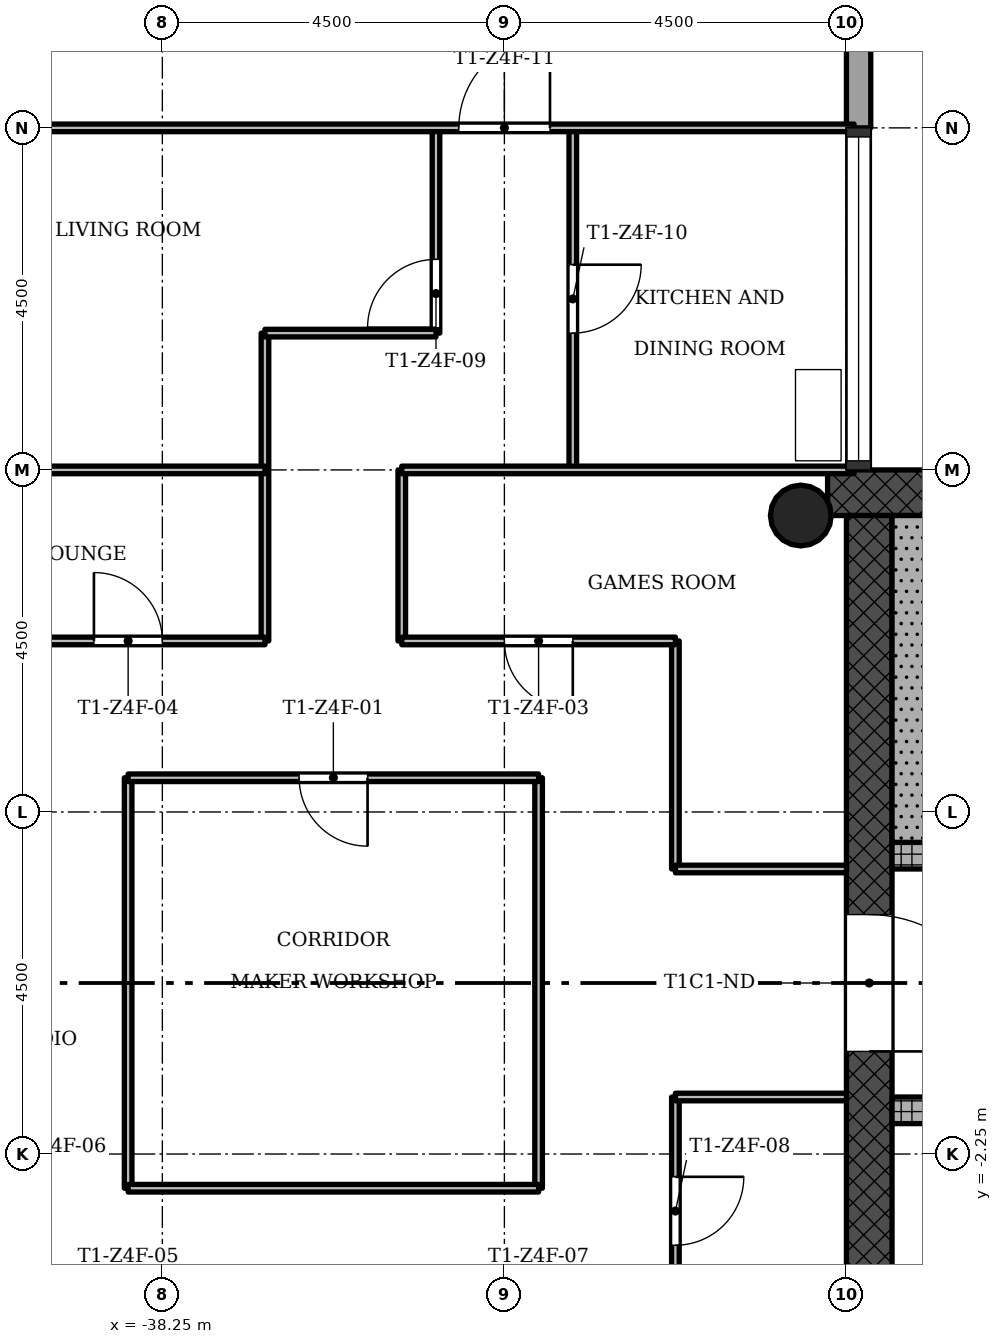
"""IFC4 building model, lengths in metres.
Left out: names, types, materials, properties, quantities, classifications, styles, units other than length and angle.
Written with IfcOpenShell. Run it as: python <this file> out.ifc"""

import sys

from ifc_helpers import new_model, si_unit, direction, frame, frame_2d, origin, origin_2d, place, context, subcontext, project, spatial, rectangle, hollow_circle, extrude, element, fill, save


model = new_model("IFC4")
c1 = context("Model", 3, precision=1e-05, world=origin(), true_north=direction((0.0, 1.0)))
c2 = subcontext(c1, "Body", "Model", "MODEL_VIEW")
j1 = project(units=[si_unit("LENGTHUNIT", "METRE"), si_unit("PLANEANGLEUNIT", "RADIAN")], contexts=[c1])
p1 = place(None, origin())
s1 = spatial("IfcSite", under=j1, at=p1, CompositionType="ELEMENT")
p2 = place(p1, origin())
s2 = spatial("IfcBuilding", under=s1, at=p2, CompositionType="ELEMENT")
p3 = place(p2, frame((0.0, 0.0, 223.2)))
s3 = spatial("IfcBuildingStorey", under=s2, at=p3, CompositionType="ELEMENT", Elevation=223.2)
p4 = place(p3, frame((-20.602, 6.45, 0.0), z_axis=(0.0, 0.0, 1.0), x_axis=(-1.0, 0.0, 0.0)))
e1 = element("IfcWall", 1, at=p4, inside=s3, PredefinedType="SHEAR", context=c2, shape_type="SweptSolid", body=[
    extrude(rectangle(XDim=8.896, YDim=0.6, at=frame_2d((4.448, 0.0))), origin(), (0.0, 0.0, 1.0), 3.4),
])
p5 = place(p3, frame((-28.95, 6.15, 0.0), z_axis=(0.0, 0.0, 1.0), x_axis=(0.0, -1.0, 0.0)))
e2 = element("IfcWall", 2, at=p5, inside=s3, PredefinedType="SHEAR", context=c2, shape_type="SweptSolid", body=[
    extrude(rectangle(XDim=12.9, YDim=0.6, at=frame_2d((6.45, 0.0))), origin(), (0.0, 0.0, 1.0), 3.4),
])
p6 = place(p5, frame((5.25, 0.0, 0.0)))
e3 = element("IfcOpeningElement", 3, at=p6, cuts=e2, PredefinedType="OPENING", context=c2, shape_type="SweptSolid", body=[
    extrude(rectangle(XDim=1.8, YDim=2.1, at=frame_2d((0.9, 1.05))), frame((0.0, 0.31, 0.0), z_axis=(0.0, -1.0, 0.0), x_axis=(1.0, 0.0, 0.0)), (0.0, 0.0, 1.0), 0.62),
])
p7 = place(p3, frame((-28.65, -1.675, 0.0), z_axis=(0.0, 0.0, 1.0), x_axis=(1.0, 0.0, 0.0)))
e4 = element("IfcWall", 4, at=p7, inside=s3, PredefinedType="SHEAR", context=c2, shape_type="SweptSolid", body=[
    extrude(rectangle(XDim=7.8, YDim=0.35, at=frame_2d((3.9, 0.0))), origin(), (0.0, 0.0, 1.0), 3.4),
])
p8 = place(p7, frame((1.15, 0.0, 0.0)))
e5 = element("IfcOpeningElement", 5, at=p8, cuts=e4, PredefinedType="OPENING", context=c2, shape_type="SweptSolid", body=[
    extrude(rectangle(XDim=1.1, YDim=2.1, at=frame_2d((0.55, 1.05))), frame((0.0, 0.185, 0.0), z_axis=(0.0, -1.0, 0.0), x_axis=(1.0, 0.0, 0.0)), (0.0, 0.0, 1.0), 0.37),
])
p9 = place(p7, frame((3.35, 0.0, 0.0)))
e6 = element("IfcOpeningElement", 6, at=p9, cuts=e4, PredefinedType="OPENING", context=c2, shape_type="SweptSolid", body=[
    extrude(rectangle(XDim=1.1, YDim=2.1, at=frame_2d((0.55, 1.05))), frame((0.0, 0.185, 0.0), z_axis=(0.0, -1.0, 0.0), x_axis=(1.0, 0.0, 0.0)), (0.0, 0.0, 1.0), 0.37),
])
p10 = place(p7, frame((5.55, 0.0, 0.0)))
e7 = element("IfcOpeningElement", 7, at=p10, cuts=e4, PredefinedType="OPENING", context=c2, shape_type="SweptSolid", body=[
    extrude(rectangle(XDim=1.1, YDim=2.1, at=frame_2d((0.55, 1.05))), frame((0.0, 0.185, 0.0), z_axis=(0.0, -1.0, 0.0), x_axis=(1.0, 0.0, 0.0)), (0.0, 0.0, 1.0), 0.37),
])
p11 = place(p3, frame((-28.65, 1.675, 0.0), z_axis=(0.0, 0.0, 1.0), x_axis=(1.0, 0.0, 0.0)))
e8 = element("IfcWall", 8, at=p11, inside=s3, PredefinedType="SHEAR", context=c2, shape_type="SweptSolid", body=[
    extrude(rectangle(XDim=7.8, YDim=0.35, at=frame_2d((3.9, 0.0))), origin(), (0.0, 0.0, 1.0), 3.4),
])
p12 = place(p11, frame((1.05, 0.0, 0.0)))
e9 = element("IfcOpeningElement", 9, at=p12, cuts=e8, PredefinedType="OPENING", context=c2, shape_type="SweptSolid", body=[
    extrude(rectangle(XDim=0.9, YDim=2.1, at=frame_2d((0.45, 1.05))), frame((0.0, 0.185, 0.0), z_axis=(0.0, -1.0, 0.0), x_axis=(1.0, 0.0, 0.0)), (0.0, 0.0, 1.0), 0.37),
])
p13 = place(p3, frame((-29.85, 6.15, 0.0), z_axis=(0.0, 0.0, 1.0), x_axis=(1.0, 0.0, 0.0)))
e10 = element("IfcColumn", 10, at=p13, inside=s3, PredefinedType="COLUMN", context=c2, shape_type="SweptSolid", body=[
    extrude(hollow_circle(Radius=0.4, WallThickness=0.028, at=origin_2d()), origin(), (0.0, 0.0, 1.0), 3.4),
])
p14 = place(p3, frame((-29.09, 11.25, -0.3), z_axis=(0.0, 0.0, 1.0), x_axis=(0.0, 1.0, 0.0)))
e11 = element("IfcWall", 11, at=p14, inside=s3, PredefinedType="STANDARD", context=c2, shape_type="SweptSolid", body=[
    extrude(rectangle(XDim=1.82, YDim=0.32, at=frame_2d((0.91, 0.0))), origin(), (0.0, 0.0, 1.0), 3.4),
])
p15 = place(p3, frame((-38.7, -2.7, 0.0), z_axis=(0.0, 0.0, 1.0), x_axis=(0.0, 1.0, 0.0)))
e12 = element("IfcWall", 12, at=p15, inside=s3, PredefinedType="PARTITIONING", context=c2, shape_type="SweptSolid", body=[
    extrude(rectangle(XDim=5.4, YDim=0.1, at=frame_2d((2.7, 0.0))), origin(), (0.0, 0.0, 1.0), 3.0),
])
p16 = place(p3, frame((-36.9, 4.5, 0.0), z_axis=(0.0, 0.0, 1.0), x_axis=(0.0, 1.0, 0.0)))
e13 = element("IfcWall", 13, at=p16, inside=s3, PredefinedType="PARTITIONING", context=c2, shape_type="SweptSolid", body=[
    extrude(rectangle(XDim=4.05, YDim=0.1, at=frame_2d((2.025, 0.0))), origin(), (0.0, 0.0, 1.0), 3.0),
])
p17 = place(p3, frame((-35.1, 4.5, 0.0), z_axis=(0.0, 0.0, 1.0), x_axis=(0.0, 1.0, 0.0)))
e14 = element("IfcWall", 14, at=p17, inside=s3, PredefinedType="PARTITIONING", context=c2, shape_type="SweptSolid", body=[
    extrude(rectangle(XDim=2.25, YDim=0.1, at=frame_2d((1.125, 0.0))), origin(), (0.0, 0.0, 1.0), 3.0),
])
p18 = place(p3, frame((-34.65, 8.55, 0.0), z_axis=(0.0, 0.0, 1.0), x_axis=(0.0, 1.0, 0.0)))
e15 = element("IfcWall", 15, at=p18, inside=s3, PredefinedType="PARTITIONING", context=c2, shape_type="SweptSolid", body=[
    extrude(rectangle(XDim=2.7, YDim=0.1, at=frame_2d((1.35, 0.0))), origin(), (0.0, 0.0, 1.0), 3.0),
])
p19 = place(p18, frame((0.07, 0.0, 0.0)))
e16 = element("IfcOpeningElement", 16, at=p19, cuts=e15, PredefinedType="OPENING", context=c2, shape_type="SweptSolid", body=[
    extrude(rectangle(XDim=0.9, YDim=2.1, at=frame_2d((0.45, 1.05))), frame((0.0, 0.06, 0.0), z_axis=(0.0, -1.0, 0.0), x_axis=(1.0, 0.0, 0.0)), (0.0, 0.0, 1.0), 0.12),
])
p20 = place(p3, frame((-33.3, -2.7, 0.0), z_axis=(0.0, 0.0, 1.0), x_axis=(0.0, 1.0, 0.0)))
e17 = element("IfcWall", 17, at=p20, inside=s3, PredefinedType="PARTITIONING", context=c2, shape_type="SweptSolid", body=[
    extrude(rectangle(XDim=5.4, YDim=0.1, at=frame_2d((2.7, 0.0))), origin(), (0.0, 0.0, 1.0), 3.0),
])
p21 = place(p3, frame((-32.85, 6.75, 0.0), z_axis=(0.0, 0.0, 1.0), x_axis=(0.0, 1.0, 0.0)))
e18 = element("IfcWall", 18, at=p21, inside=s3, PredefinedType="PARTITIONING", context=c2, shape_type="SweptSolid", body=[
    extrude(rectangle(XDim=4.5, YDim=0.1, at=frame_2d((2.25, 0.0))), origin(), (0.0, 0.0, 1.0), 3.0),
])
p22 = place(p21, frame((1.8, 0.0, 0.0)))
e19 = element("IfcOpeningElement", 19, at=p22, cuts=e18, PredefinedType="OPENING", context=c2, shape_type="SweptSolid", body=[
    extrude(rectangle(XDim=0.9, YDim=2.1, at=frame_2d((0.45, 1.05))), frame((0.0, 0.06, 0.0), z_axis=(0.0, -1.0, 0.0), x_axis=(1.0, 0.0, 0.0)), (0.0, 0.0, 1.0), 0.12),
])
p23 = place(p3, frame((-31.5, -6.75, 0.0), z_axis=(0.0, 0.0, 1.0), x_axis=(0.0, 1.0, 0.0)))
e20 = element("IfcWall", 20, at=p23, inside=s3, PredefinedType="PARTITIONING", context=c2, shape_type="SweptSolid", body=[
    extrude(rectangle(XDim=5.25, YDim=0.1, at=frame_2d((2.625, 0.0))), origin(), (0.0, 0.0, 1.0), 3.0),
])
p24 = place(p23, frame((3.3, 0.0, 0.0)))
e21 = element("IfcOpeningElement", 21, at=p24, cuts=e20, PredefinedType="OPENING", context=c2, shape_type="SweptSolid", body=[
    extrude(rectangle(XDim=0.9, YDim=2.1, at=frame_2d((0.45, 1.05))), frame((0.0, 0.06, 0.0), z_axis=(0.0, -1.0, 0.0), x_axis=(1.0, 0.0, 0.0)), (0.0, 0.0, 1.0), 0.12),
])
p25 = place(p3, frame((-31.5, 1.5, 0.0), z_axis=(0.0, 0.0, 1.0), x_axis=(0.0, 1.0, 0.0)))
e22 = element("IfcWall", 22, at=p25, inside=s3, PredefinedType="PARTITIONING", context=c2, shape_type="SweptSolid", body=[
    extrude(rectangle(XDim=3.0, YDim=0.1, at=frame_2d((1.5, 0.0))), origin(), (0.0, 0.0, 1.0), 3.0),
])
p26 = place(p3, frame((-38.7, -2.7, 0.0), z_axis=(0.0, 0.0, 1.0), x_axis=(1.0, 0.0, 0.0)))
e23 = element("IfcWall", 23, at=p26, inside=s3, PredefinedType="PARTITIONING", context=c2, shape_type="SweptSolid", body=[
    extrude(rectangle(XDim=5.4, YDim=0.1, at=frame_2d((2.7, 0.0))), origin(), (0.0, 0.0, 1.0), 3.0),
])
for number, where, z_axis, x_axis in (
    (24, (-31.5, -1.5, 0.0), (0.0, 0.0, 1.0), (1.0, 0.0, 0.0)),
    (25, (-31.5, 1.5, 0.0), (0.0, 0.0, 1.0), (1.0, 0.0, 0.0)),
):
    element("IfcWall", number, at=place(p3, frame(where, z_axis=z_axis, x_axis=x_axis)), inside=s3, PredefinedType="PARTITIONING", context=c2, shape_type="SweptSolid", body=[
        extrude(rectangle(XDim=2.25, YDim=0.1, at=frame_2d((1.125, 0.0))), origin(), (0.0, 0.0, 1.0), 3.0),
    ])
p27 = place(p3, frame((-38.7, 2.7, 0.0), z_axis=(0.0, 0.0, 1.0), x_axis=(1.0, 0.0, 0.0)))
e26 = element("IfcWall", 26, at=p27, inside=s3, PredefinedType="PARTITIONING", context=c2, shape_type="SweptSolid", body=[
    extrude(rectangle(XDim=5.4, YDim=0.1, at=frame_2d((2.7, 0.0))), origin(), (0.0, 0.0, 1.0), 3.0),
])
p28 = place(p27, frame((2.25, 0.0, 0.0)))
e27 = element("IfcOpeningElement", 27, at=p28, cuts=e26, PredefinedType="OPENING", context=c2, shape_type="SweptSolid", body=[
    extrude(rectangle(XDim=0.9, YDim=2.1, at=frame_2d((0.45, 1.05))), frame((0.0, 0.06, 0.0), z_axis=(0.0, -1.0, 0.0), x_axis=(1.0, 0.0, 0.0)), (0.0, 0.0, 1.0), 0.12),
])
p29 = place(p3, frame((-40.5, 4.5, 0.0), z_axis=(0.0, 0.0, 1.0), x_axis=(1.0, 0.0, 0.0)))
e28 = element("IfcWall", 28, at=p29, inside=s3, PredefinedType="PARTITIONING", context=c2, shape_type="SweptSolid", body=[
    extrude(rectangle(XDim=3.6, YDim=0.1, at=frame_2d((1.8, 0.0))), origin(), (0.0, 0.0, 1.0), 3.0),
])
p30 = place(p29, frame((1.35, 0.0, 0.0)))
e29 = element("IfcOpeningElement", 29, at=p30, cuts=e28, PredefinedType="OPENING", context=c2, shape_type="SweptSolid", body=[
    extrude(rectangle(XDim=0.9, YDim=2.1, at=frame_2d((0.45, 1.05))), frame((0.0, 0.06, 0.0), z_axis=(0.0, -1.0, 0.0), x_axis=(1.0, 0.0, 0.0)), (0.0, 0.0, 1.0), 0.12),
])
p31 = place(p3, frame((-35.1, 4.5, 0.0), z_axis=(0.0, 0.0, 1.0), x_axis=(1.0, 0.0, 0.0)))
e30 = element("IfcWall", 30, at=p31, inside=s3, PredefinedType="PARTITIONING", context=c2, shape_type="SweptSolid", body=[
    extrude(rectangle(XDim=3.6, YDim=0.1, at=frame_2d((1.8, 0.0))), origin(), (0.0, 0.0, 1.0), 3.0),
])
p32 = place(p31, frame((1.35, 0.0, 0.0)))
e31 = element("IfcOpeningElement", 31, at=p32, cuts=e30, PredefinedType="OPENING", context=c2, shape_type="SweptSolid", body=[
    extrude(rectangle(XDim=0.9, YDim=2.1, at=frame_2d((0.45, 1.05))), frame((0.0, 0.06, 0.0), z_axis=(0.0, -1.0, 0.0), x_axis=(1.0, 0.0, 0.0)), (0.0, 0.0, 1.0), 0.12),
])
for number, where, z_axis, x_axis in (
    (32, (-42.85, 6.75, 0.0), (0.0, 0.0, 1.0), (1.0, 0.0, 0.0)),
    (33, (-35.1, 6.75, 0.0), (0.0, 0.0, 1.0), (1.0, 0.0, 0.0)),
):
    element("IfcWall", number, at=place(p3, frame(where, z_axis=z_axis, x_axis=x_axis)), inside=s3, PredefinedType="PARTITIONING", context=c2, shape_type="SweptSolid", body=[
        extrude(rectangle(XDim=5.95, YDim=0.1, at=frame_2d((2.975, 0.0))), origin(), (0.0, 0.0, 1.0), 3.0),
    ])
p33 = place(p3, frame((-36.9, 8.55, 0.0), z_axis=(0.0, 0.0, 1.0), x_axis=(1.0, 0.0, 0.0)))
e34 = element("IfcWall", 34, at=p33, inside=s3, PredefinedType="PARTITIONING", context=c2, shape_type="SweptSolid", body=[
    extrude(rectangle(XDim=2.25, YDim=0.1, at=frame_2d((1.125, 0.0))), origin(), (0.0, 0.0, 1.0), 3.0),
])
p34 = place(p3, frame((-42.85, 11.25, 0.0), z_axis=(0.0, 0.0, 1.0), x_axis=(1.0, 0.0, 0.0)))
e35 = element("IfcWall", 35, at=p34, inside=s3, PredefinedType="PARTITIONING", context=c2, shape_type="SweptSolid", body=[
    extrude(rectangle(XDim=13.7, YDim=0.1, at=frame_2d((6.85, 0.0))), origin(), (0.0, 0.0, 1.0), 3.0),
])
p35 = place(p34, frame((8.5, 0.0, 0.0)))
e36 = element("IfcOpeningElement", 36, at=p35, cuts=e35, PredefinedType="OPENING", context=c2, shape_type="SweptSolid", body=[
    extrude(rectangle(XDim=1.2, YDim=2.1, at=frame_2d((0.6, 1.05))), frame((0.0, 0.06, 0.0), z_axis=(0.0, -1.0, 0.0), x_axis=(1.0, 0.0, 0.0)), (0.0, 0.0, 1.0), 0.12),
])
p36 = place(p3, frame((-28.35, 1.85, 0.0), z_axis=(0.0, 0.0, 1.0), x_axis=(0.0, 1.0, 0.0)))
e37 = element("IfcWall", 37, at=p36, inside=s3, PredefinedType="SHEAR", context=c2, shape_type="SweptSolid", body=[
    extrude(rectangle(XDim=4.3, YDim=0.6, at=frame_2d((2.15, 0.0))), origin(), (0.0, 0.0, 1.0), 3.4),
])
p37 = place(p28, origin())
e38 = element("IfcDoor", 38, at=p37, inside=s3, OperationType="SINGLE_SWING_RIGHT", PredefinedType="DOOR", context=c2, shape_type="SweptSolid", body=[
    extrude(rectangle(XDim=0.9, YDim=2.1, at=frame_2d((0.45, 1.05))), frame((0.0, 0.025, 0.0), z_axis=(0.0, -1.0, 0.0), x_axis=(1.0, 0.0, 0.0)), (0.0, 0.0, 1.0), 0.05),
])
fill(e27, e38)
p38 = place(p32, origin())
e39 = element("IfcDoor", 39, at=p38, inside=s3, OperationType="SINGLE_SWING_RIGHT", PredefinedType="DOOR", context=c2, shape_type="SweptSolid", body=[
    extrude(rectangle(XDim=0.9, YDim=2.1, at=frame_2d((0.45, 1.05))), frame((0.0, 0.025, 0.0), z_axis=(0.0, -1.0, 0.0), x_axis=(1.0, 0.0, 0.0)), (0.0, 0.0, 1.0), 0.05),
])
fill(e31, e39)
p39 = place(p30, origin())
e40 = element("IfcDoor", 40, at=p39, inside=s3, OperationType="SINGLE_SWING_RIGHT", PredefinedType="DOOR", context=c2, shape_type="SweptSolid", body=[
    extrude(rectangle(XDim=0.9, YDim=2.1, at=frame_2d((0.45, 1.05))), frame((0.0, 0.025, 0.0), z_axis=(0.0, -1.0, 0.0), x_axis=(1.0, 0.0, 0.0)), (0.0, 0.0, 1.0), 0.05),
])
fill(e29, e40)
p40 = place(p24, origin())
e41 = element("IfcDoor", 41, at=p40, inside=s3, OperationType="SINGLE_SWING_RIGHT", PredefinedType="DOOR", context=c2, shape_type="SweptSolid", body=[
    extrude(rectangle(XDim=0.9, YDim=2.1, at=frame_2d((0.45, 1.05))), frame((0.0, 0.025, 0.0), z_axis=(0.0, -1.0, 0.0), x_axis=(1.0, 0.0, 0.0)), (0.0, 0.0, 1.0), 0.05),
])
fill(e21, e41)
p41 = place(p19, origin())
e42 = element("IfcDoor", 42, at=p41, inside=s3, OperationType="SINGLE_SWING_RIGHT", PredefinedType="DOOR", context=c2, shape_type="SweptSolid", body=[
    extrude(rectangle(XDim=0.9, YDim=2.1, at=frame_2d((0.45, 1.05))), frame((0.0, 0.025, 0.0), z_axis=(0.0, -1.0, 0.0), x_axis=(1.0, 0.0, 0.0)), (0.0, 0.0, 1.0), 0.05),
])
fill(e16, e42)
p42 = place(p22, origin())
e43 = element("IfcDoor", 43, at=p42, inside=s3, OperationType="SINGLE_SWING_RIGHT", PredefinedType="DOOR", context=c2, shape_type="SweptSolid", body=[
    extrude(rectangle(XDim=0.9, YDim=2.1, at=frame_2d((0.45, 1.05))), frame((0.0, 0.025, 0.0), z_axis=(0.0, -1.0, 0.0), x_axis=(1.0, 0.0, 0.0)), (0.0, 0.0, 1.0), 0.05),
])
fill(e19, e43)
p43 = place(p35, origin())
e44 = element("IfcDoor", 44, at=p43, inside=s3, OperationType="SINGLE_SWING_LEFT", PredefinedType="DOOR", context=c2, shape_type="SweptSolid", body=[
    extrude(rectangle(XDim=1.2, YDim=2.1, at=frame_2d((0.6, 1.05))), frame((0.0, 0.025, 0.0), z_axis=(0.0, -1.0, 0.0), x_axis=(1.0, 0.0, 0.0)), (0.0, 0.0, 1.0), 0.05),
])
fill(e36, e44)
p44 = place(p6, origin())
e45 = element("IfcDoor", 45, at=p44, inside=s3, OperationType="SINGLE_SWING_LEFT", PredefinedType="DOOR", context=c2, shape_type="SweptSolid", body=[
    extrude(rectangle(XDim=1.8, YDim=2.1, at=frame_2d((0.9, 1.05))), frame((0.0, 0.025, 0.0), z_axis=(0.0, -1.0, 0.0), x_axis=(1.0, 0.0, 0.0)), (0.0, 0.0, 1.0), 0.05),
])
fill(e3, e45)
save(model, sys.argv[1])
